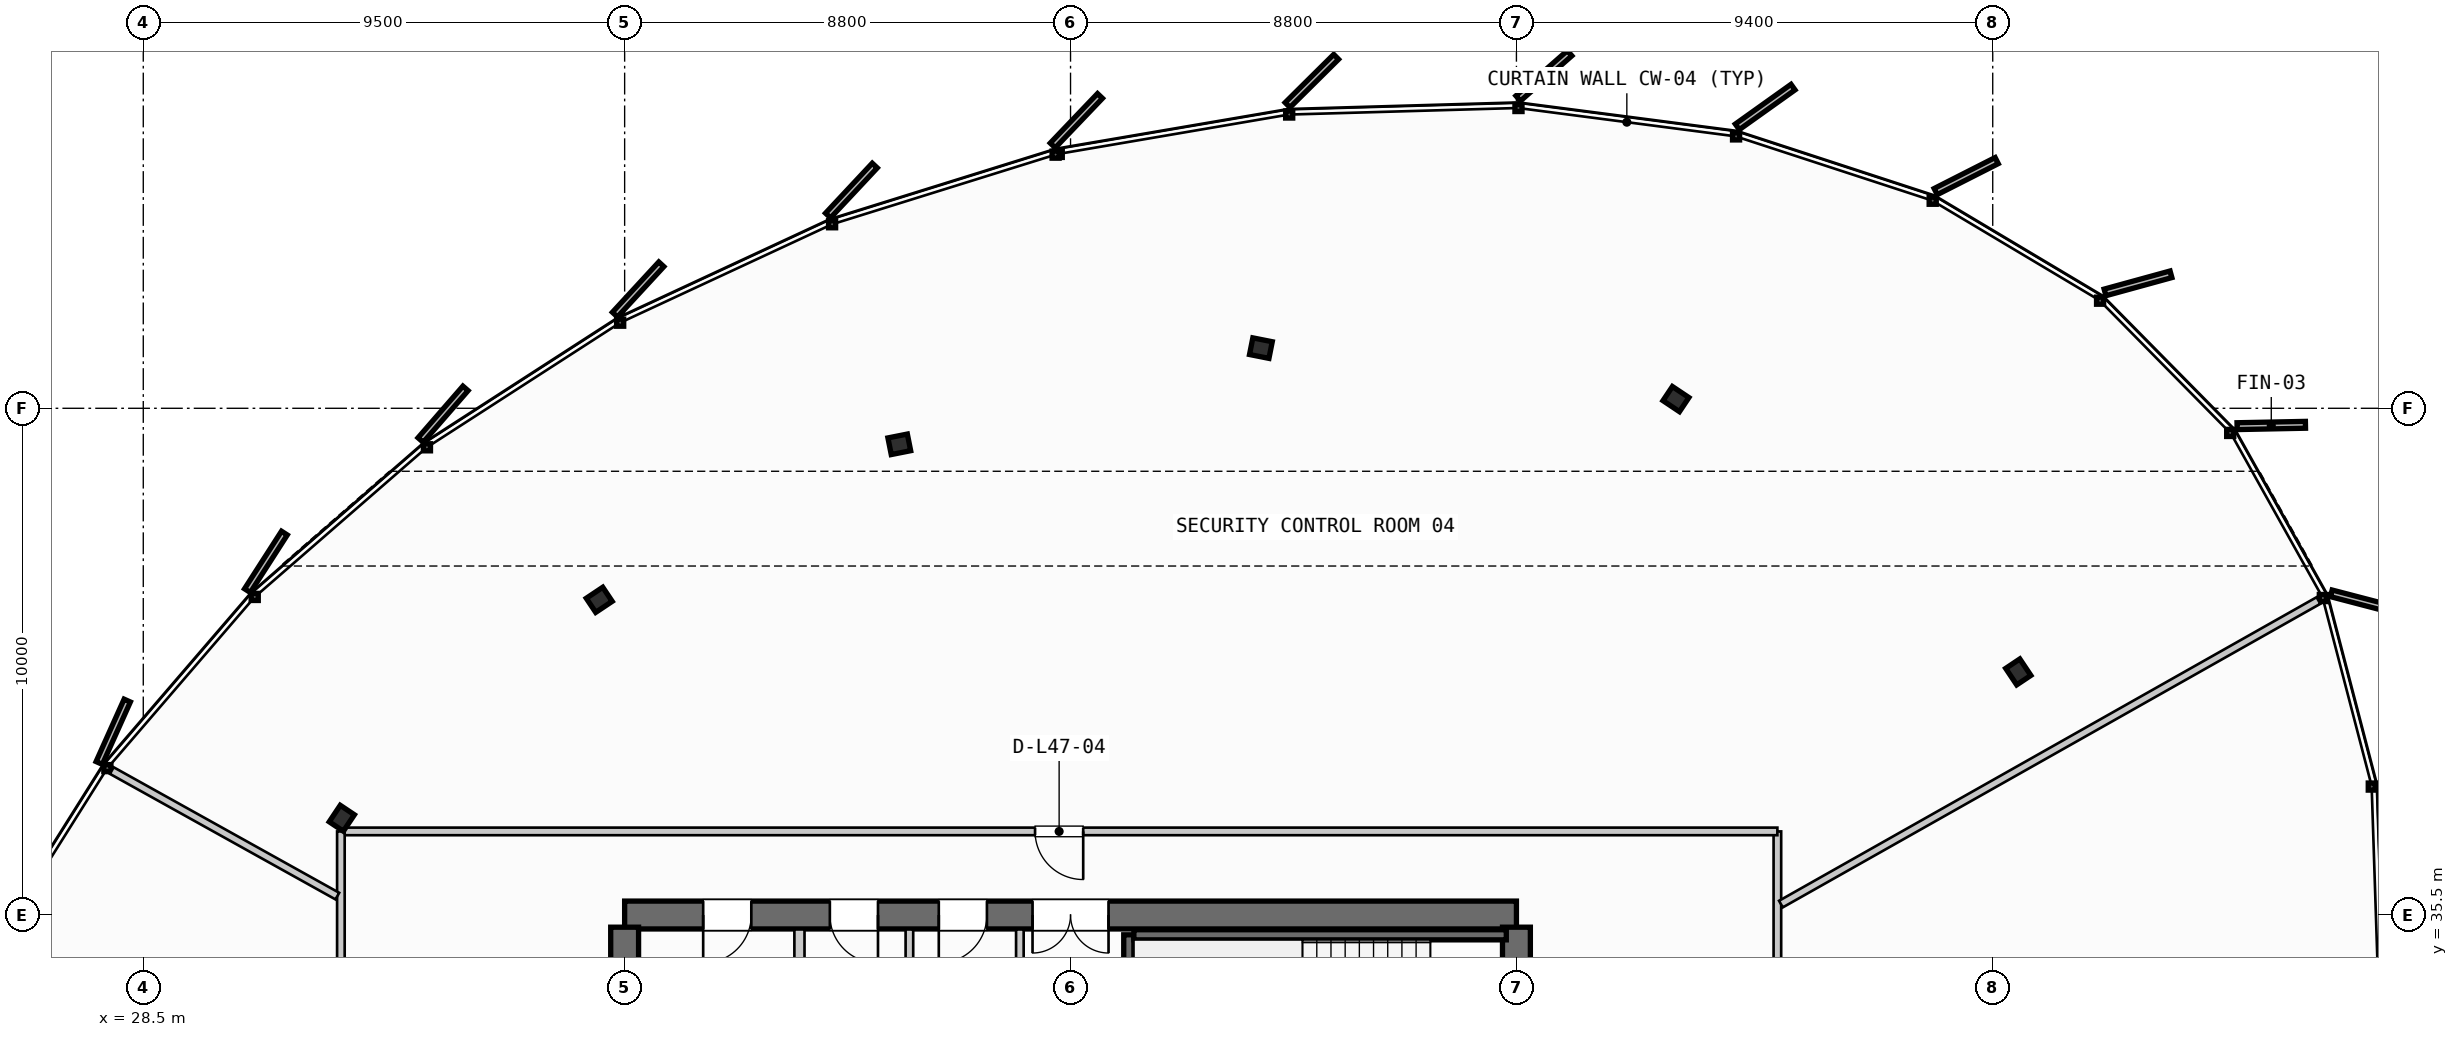
"""IFC4 building model, lengths in metres.
Left out: names, types, materials, properties, quantities, classifications, styles, units other than length and angle.
Written with IfcOpenShell. Run it as: python <this file> out.ifc"""

import sys

from ifc_helpers import new_model, si_unit, direction, frame, frame_2d, origin, origin_2d, place, context, subcontext, project, spatial, rectangle, i_section, extrude, source, transform, mapped, element, fill, save


model = new_model("IFC4")
c1 = context("Model", 3, precision=1e-05, world=origin(), true_north=direction((0.0, 1.0)))
c2 = subcontext(c1, "Body", "Model", "MODEL_VIEW")
j1 = project(units=[si_unit("LENGTHUNIT", "METRE"), si_unit("PLANEANGLEUNIT", "RADIAN")], contexts=[c1])
p1 = place(None, origin())
s1 = spatial("IfcSite", under=j1, at=p1, CompositionType="ELEMENT")
p2 = place(p1, origin())
s2 = spatial("IfcBuilding", under=s1, at=p2, CompositionType="ELEMENT")
p3 = place(p2, frame((0.0, 0.0, 183.4)))
s3 = spatial("IfcBuildingStorey", under=s2, at=p3, CompositionType="ELEMENT", Elevation=183.4)
p4 = place(p3, frame((55.6, 35.5, 0.0), z_axis=(0.0, 0.0, 1.0), x_axis=(-1.0, 0.0, 0.0)))
e1 = element("IfcWall", 1, at=p4, inside=s3, PredefinedType="SHEAR", context=c2, shape_type="SweptSolid", body=[
    extrude(rectangle(XDim=17.6, YDim=0.55, at=frame_2d((8.8, 0.0))), origin(), (0.0, 0.0, 1.0), 3.26),
])
p5 = place(p4, frame((8.05, 0.0, 0.0)))
e2 = element("IfcOpeningElement", 2, at=p5, cuts=e1, PredefinedType="OPENING", context=c2, shape_type="SweptSolid", body=[
    extrude(rectangle(XDim=1.5, YDim=2.2, at=frame_2d((0.75, 1.1))), frame((0.0, 0.285, 0.0), z_axis=(0.0, -1.0, 0.0), x_axis=(1.0, 0.0, 0.0)), (0.0, 0.0, 1.0), 0.57),
])
p6 = place(p4, frame((15.1, 0.0, 0.0)))
e3 = element("IfcOpeningElement", 3, at=p6, cuts=e1, PredefinedType="OPENING", context=c2, shape_type="SweptSolid", body=[
    extrude(rectangle(XDim=0.95, YDim=2.15, at=frame_2d((0.475, 1.075))), frame((0.0, 0.285, 0.0), z_axis=(0.0, -1.0, 0.0), x_axis=(1.0, 0.0, 0.0)), (0.0, 0.0, 1.0), 0.57),
])
p7 = place(p4, frame((12.6, 0.0, 0.0)))
e4 = element("IfcOpeningElement", 4, at=p7, cuts=e1, PredefinedType="OPENING", context=c2, shape_type="SweptSolid", body=[
    extrude(rectangle(XDim=0.95, YDim=2.15, at=frame_2d((0.475, 1.075))), frame((0.0, 0.285, 0.0), z_axis=(0.0, -1.0, 0.0), x_axis=(1.0, 0.0, 0.0)), (0.0, 0.0, 1.0), 0.57),
])
p8 = place(p4, frame((10.45, 0.0, 0.0)))
e5 = element("IfcOpeningElement", 5, at=p8, cuts=e1, PredefinedType="OPENING", context=c2, shape_type="SweptSolid", body=[
    extrude(rectangle(XDim=0.95, YDim=2.15, at=frame_2d((0.475, 1.075))), frame((0.0, 0.285, 0.0), z_axis=(0.0, -1.0, 0.0), x_axis=(1.0, 0.0, 0.0)), (0.0, 0.0, 1.0), 0.57),
])
p9 = place(p3, frame((38.0, 35.26, 0.0), z_axis=(0.0, 0.0, 1.0), x_axis=(0.0, -1.0, 0.0)))
e6 = element("IfcWall", 6, at=p9, inside=s3, PredefinedType="SHEAR", context=c2, shape_type="SweptSolid", body=[
    extrude(rectangle(XDim=14.92, YDim=0.55, at=frame_2d((7.46, 0.0))), origin(), (0.0, 0.0, 1.0), 3.26),
])
p10 = place(p9, frame((5.21, 0.0, 0.0)))
e7 = element("IfcOpeningElement", 7, at=p10, cuts=e6, PredefinedType="OPENING", context=c2, shape_type="SweptSolid", body=[
    extrude(rectangle(XDim=1.1, YDim=2.2, at=frame_2d((0.55, 1.1))), frame((0.0, 0.285, 0.0), z_axis=(0.0, -1.0, 0.0), x_axis=(1.0, 0.0, 0.0)), (0.0, 0.0, 1.0), 0.57),
])
p11 = place(p3, frame((55.6, 20.34, 0.0), z_axis=(0.0, 0.0, 1.0), x_axis=(0.0, 1.0, 0.0)))
e8 = element("IfcWall", 8, at=p11, inside=s3, PredefinedType="SHEAR", context=c2, shape_type="SweptSolid", body=[
    extrude(rectangle(XDim=14.92, YDim=0.55, at=frame_2d((7.46, 0.0))), origin(), (0.0, 0.0, 1.0), 3.26),
])
p12 = place(p11, frame((12.71, 0.0, 0.0)))
e9 = element("IfcOpeningElement", 9, at=p12, cuts=e8, PredefinedType="OPENING", context=c2, shape_type="SweptSolid", body=[
    extrude(rectangle(XDim=1.05, YDim=2.15, at=frame_2d((0.525, 1.075))), frame((0.0, 0.285, 0.0), z_axis=(0.0, -1.0, 0.0), x_axis=(1.0, 0.0, 0.0)), (0.0, 0.0, 1.0), 0.57),
])
p13 = place(p11, frame((8.61, 0.0, 0.0)))
e10 = element("IfcOpeningElement", 10, at=p13, cuts=e8, PredefinedType="OPENING", context=c2, shape_type="SweptSolid", body=[
    extrude(rectangle(XDim=1.1, YDim=2.2, at=frame_2d((0.55, 1.1))), frame((0.0, 0.285, 0.0), z_axis=(0.0, -1.0, 0.0), x_axis=(1.0, 0.0, 0.0)), (0.0, 0.0, 1.0), 0.57),
])
m1 = source(origin(), c2, "Body", "SweptSolid", [
    extrude(i_section(OverallWidth=0.391, OverallDepth=0.335, WebThickness=0.023, FlangeThickness=0.034, FilletRadius=0.015, at=origin_2d()), origin(), (0.0, 0.0, 1.0), 3.26),
])
for number, where, z_axis, x_axis in (
    (11, (65.504, 40.298, 0.0), (0.0, 0.0, 1.0), (0.831, 0.556, 0.0)),
    (12, (58.748, 45.681, 0.0), (0.0, 0.0, 1.0), (0.556, 0.831, 0.0)),
    (13, (50.557, 46.688, 0.0), (0.0, 0.0, 1.0), (0.195, 0.981, 0.0)),
    (14, (43.421, 44.789, 0.0), (0.0, 0.0, 1.0), (-0.195, 0.981, 0.0)),
    (15, (37.499, 41.72, 0.0), (0.0, 0.0, 1.0), (-0.556, 0.831, 0.0)),
    (16, (32.418, 37.409, 0.0), (0.0, 0.0, 1.0), (-0.831, 0.556, 0.0)),
):
    element("IfcColumn", number, at=place(p3, frame(where, z_axis=z_axis, x_axis=x_axis)), inside=s3, PredefinedType="COLUMN", context=c2, shape_type="MappedRepresentation", body=[
        mapped(m1, transform((0.0, 0.0, 0.0), scale=1.0)),
    ])
p14 = place(p3, frame((47.95, 32.05, 0.0), z_axis=(0.0, 0.0, 1.0), x_axis=(0.0, 1.0, 0.0)))
e17 = element("IfcWall", 17, at=p14, inside=s3, PredefinedType="SHEAR", context=c2, shape_type="SweptSolid", body=[
    extrude(rectangle(XDim=3.06, YDim=0.2, at=frame_2d((1.53, 0.0))), origin(), (0.0, 0.0, 1.0), 3.26),
])
p15 = place(p3, frame((48.05, 35.11, 0.0), z_axis=(0.0, 0.0, 1.0), x_axis=(1.0, 0.0, 0.0)))
e18 = element("IfcWall", 18, at=p15, inside=s3, PredefinedType="SHEAR", context=c2, shape_type="SweptSolid", body=[
    extrude(rectangle(XDim=7.35, YDim=0.2, at=frame_2d((3.675, 0.0))), origin(), (0.0, 0.0, 1.0), 3.26),
])
p16 = place(p3, frame((41.45, 31.85, 0.0), z_axis=(0.0, 0.0, 1.0), x_axis=(0.0, 1.0, 0.0)))
e19 = element("IfcWall", 19, at=p16, inside=s3, PredefinedType="PARTITIONING", context=c2, shape_type="SweptSolid", body=[
    extrude(rectangle(XDim=3.365, YDim=0.2, at=frame_2d((1.683, 0.0))), origin(), (0.0, 0.0, 1.0), 2.28),
])
p17 = place(p3, frame((45.8, 31.85, 0.0), z_axis=(0.0, 0.0, 1.0), x_axis=(0.0, 1.0, 0.0)))
e20 = element("IfcWall", 20, at=p17, inside=s3, PredefinedType="PARTITIONING", context=c2, shape_type="SweptSolid", body=[
    extrude(rectangle(XDim=3.365, YDim=0.15, at=frame_2d((1.683, 0.0))), origin(), (0.0, 0.0, 1.0), 2.28),
])
p18 = place(p3, frame((43.62, 31.85, 0.0), z_axis=(0.0, 0.0, 1.0), x_axis=(0.0, 1.0, 0.0)))
e21 = element("IfcWall", 21, at=p18, inside=s3, PredefinedType="PLUMBINGWALL", context=c2, shape_type="SweptSolid", body=[
    extrude(rectangle(XDim=3.365, YDim=0.15, at=frame_2d((1.683, 0.0))), origin(), (0.0, 0.0, 1.0), 2.28),
])
p19 = place(p3, frame((60.75, 34.5, 0.0), z_axis=(0.0, 0.0, 1.0), x_axis=(0.0, 1.0, 0.0)))
e22 = element("IfcWall", 22, at=p19, inside=s3, PredefinedType="PARTITIONING", context=c2, shape_type="SweptSolid", body=[
    extrude(rectangle(XDim=2.65, YDim=0.15, at=frame_2d((1.325, 0.0))), origin(), (0.0, 0.0, 1.0), 2.28),
])
p20 = place(p3, frame((60.75, 37.15, 0.0), z_axis=(0.0, 0.0, 1.0), x_axis=(-1.0, 0.0, 0.0)))
e23 = element("IfcWall", 23, at=p20, inside=s3, PredefinedType="PARTITIONING", context=c2, shape_type="SweptSolid", body=[
    extrude(rectangle(XDim=28.35, YDim=0.15, at=frame_2d((14.175, 0.0))), origin(), (0.0, 0.0, 1.0), 2.28),
])
p21 = place(p20, frame((13.7, 0.0, 0.0)))
e24 = element("IfcOpeningElement", 24, at=p21, cuts=e23, PredefinedType="OPENING", context=c2, shape_type="SweptSolid", body=[
    extrude(rectangle(XDim=0.95, YDim=2.15, at=frame_2d((0.475, 1.075))), frame((0.0, 0.085, 0.0), z_axis=(0.0, -1.0, 0.0), x_axis=(1.0, 0.0, 0.0)), (0.0, 0.0, 1.0), 0.17),
])
p22 = place(p3, frame((32.4, 37.15, 0.0), z_axis=(0.0, 0.0, 1.0), x_axis=(0.0, -1.0, 0.0)))
e25 = element("IfcWall", 25, at=p22, inside=s3, PredefinedType="PARTITIONING", context=c2, shape_type="SweptSolid", body=[
    extrude(rectangle(XDim=2.65, YDim=0.15, at=frame_2d((1.325, 0.0))), origin(), (0.0, 0.0, 1.0), 2.28),
])
p23 = place(p3, frame((60.82, 35.716, 0.0), z_axis=(0.0, 0.0, 1.0), x_axis=(0.870759825279, 0.491708579019, 0.0)))
e26 = element("IfcWall", 26, at=p23, inside=s3, PredefinedType="PARTITIONING", context=c2, shape_type="SweptSolid", body=[
    extrude(rectangle(XDim=12.184, YDim=0.15, at=frame_2d((6.092, 0.0))), origin(), (0.0, 0.0, 1.0), 2.28),
])
p24 = place(p3, frame((32.33, 35.873, 0.0), z_axis=(0.0, 0.0, 1.0), x_axis=(-0.873799869627, 0.486285705979, 0.0)))
e27 = element("IfcWall", 27, at=p24, inside=s3, PredefinedType="PARTITIONING", context=c2, shape_type="SweptSolid", body=[
    extrude(rectangle(XDim=5.094, YDim=0.15, at=frame_2d((2.547, 0.0))), origin(), (0.0, 0.0, 1.0), 2.28),
])
m2 = source(origin(), c2, "Body", "SweptSolid", [
    extrude(rectangle(XDim=1.5, YDim=2.2, at=frame_2d((0.75, 1.1))), frame((0.0, 0.025, 0.0), z_axis=(0.0, -1.0, 0.0), x_axis=(1.0, 0.0, 0.0)), (0.0, 0.0, 1.0), 0.05),
])
p25 = place(p5, origin())
e28 = element("IfcDoor", 28, at=p25, inside=s3, OperationType="DOUBLE_DOOR_SINGLE_SWING", PredefinedType="DOOR", context=c2, shape_type="MappedRepresentation", body=[
    mapped(m2, transform((0.0, 0.0, 0.0), scale=1.0)),
])
fill(e2, e28)
m3 = source(origin(), c2, "Body", "SweptSolid", [
    extrude(rectangle(XDim=0.95, YDim=2.15, at=frame_2d((0.475, 1.075))), frame((0.0, 0.025, 0.0), z_axis=(0.0, -1.0, 0.0), x_axis=(1.0, 0.0, 0.0)), (0.0, 0.0, 1.0), 0.05),
])
p26 = place(p6, origin())
e29 = element("IfcDoor", 29, at=p26, inside=s3, OperationType="SINGLE_SWING_RIGHT", PredefinedType="DOOR", context=c2, shape_type="MappedRepresentation", body=[
    mapped(m3, transform((0.0, 0.0, 0.0), scale=1.0)),
])
fill(e3, e29)
p27 = place(p7, origin())
e30 = element("IfcDoor", 30, at=p27, inside=s3, OperationType="SINGLE_SWING_LEFT", PredefinedType="DOOR", context=c2, shape_type="MappedRepresentation", body=[
    mapped(m3, transform((0.0, 0.0, 0.0), scale=1.0)),
])
fill(e4, e30)
p28 = place(p8, origin())
e31 = element("IfcDoor", 31, at=p28, inside=s3, OperationType="SINGLE_SWING_RIGHT", PredefinedType="DOOR", context=c2, shape_type="MappedRepresentation", body=[
    mapped(m3, transform((0.0, 0.0, 0.0), scale=1.0)),
])
fill(e5, e31)
p29 = place(p21, origin())
e32 = element("IfcDoor", 32, at=p29, inside=s3, OperationType="SINGLE_SWING_LEFT", PredefinedType="DOOR", context=c2, shape_type="MappedRepresentation", body=[
    mapped(m3, transform((0.0, 0.0, 0.0), scale=1.0)),
])
fill(e24, e32)
save(model, sys.argv[1])
